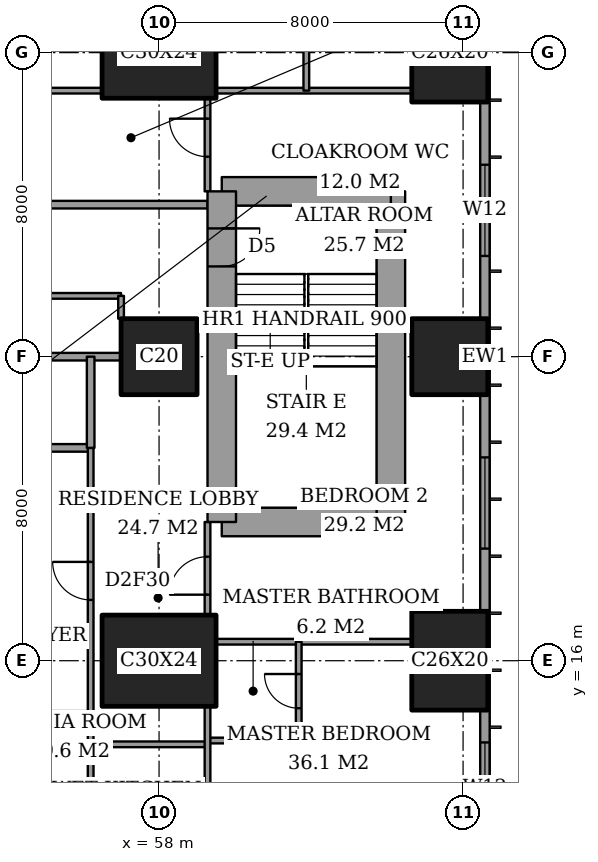
"""IFC4 building model, lengths in metres.
Left out: names, types, materials, properties, quantities, classifications, styles, units other than length and angle.
Written with IfcOpenShell. Run it as: python <this file> out.ifc"""

import sys

from ifc_helpers import new_model, si_unit, direction, frame, frame_2d, origin, origin_2d, place, context, subcontext, project, spatial, rectangle, extrude, element, fill, save


model = new_model("IFC4")
c1 = context("Model", 3, precision=1e-05, world=origin(), true_north=direction((0.0, 1.0)))
c2 = subcontext(c1, "Body", "Model", "MODEL_VIEW")
j1 = project(units=[si_unit("LENGTHUNIT", "METRE"), si_unit("PLANEANGLEUNIT", "RADIAN")], contexts=[c1])
p1 = place(None, origin())
s1 = spatial("IfcSite", under=j1, at=p1, CompositionType="ELEMENT")
p2 = place(p1, origin())
s2 = spatial("IfcBuilding", under=s1, at=p2, CompositionType="ELEMENT")
p3 = place(p2, frame((0.0, 0.0, 96.2)))
s3 = spatial("IfcBuildingStorey", under=s2, at=p3, CompositionType="ELEMENT", Elevation=96.2)
p4 = place(p3, frame((58.0, 16.0, 0.0), z_axis=(0.0, 0.0, 1.0), x_axis=(1.0, 0.0, 0.0)))
e1 = element("IfcColumn", 1, at=p4, inside=s3, PredefinedType="COLUMN", context=c2, shape_type="SweptSolid", body=[
    extrude(rectangle(XDim=3.0, YDim=2.4, at=origin_2d()), origin(), (0.0, 0.0, 1.0), 3.6),
])
p5 = place(p3, frame((58.0, 24.0, 0.0), z_axis=(0.0, 0.0, 1.0), x_axis=(1.0, 0.0, 0.0)))
e2 = element("IfcColumn", 2, at=p5, inside=s3, PredefinedType="COLUMN", context=c2, shape_type="SweptSolid", body=[
    extrude(rectangle(XDim=2.0, YDim=2.0, at=origin_2d()), origin(), (0.0, 0.0, 1.0), 3.6),
])
p6 = place(p3, frame((58.0, 32.0, 0.0), z_axis=(0.0, 0.0, 1.0), x_axis=(1.0, 0.0, 0.0)))
e3 = element("IfcColumn", 3, at=p6, inside=s3, PredefinedType="COLUMN", context=c2, shape_type="SweptSolid", body=[
    extrude(rectangle(XDim=3.0, YDim=2.4, at=origin_2d()), origin(), (0.0, 0.0, 1.0), 3.6),
])
p7 = place(p3, frame((65.65, 16.0, 0.0), z_axis=(0.0, 0.0, 1.0), x_axis=(0.0, 1.0, 0.0)))
e4 = element("IfcColumn", 4, at=p7, inside=s3, PredefinedType="COLUMN", context=c2, shape_type="SweptSolid", body=[
    extrude(rectangle(XDim=2.6, YDim=2.0, at=origin_2d()), origin(), (0.0, 0.0, 1.0), 3.6),
])
p8 = place(p3, frame((65.65, 24.0, 0.0), z_axis=(0.0, 0.0, 1.0), x_axis=(1.0, 0.0, 0.0)))
e5 = element("IfcColumn", 5, at=p8, inside=s3, PredefinedType="COLUMN", context=c2, shape_type="SweptSolid", body=[
    extrude(rectangle(XDim=2.0, YDim=2.0, at=origin_2d()), origin(), (0.0, 0.0, 1.0), 3.6),
])
p9 = place(p3, frame((65.65, 32.0, 0.0), z_axis=(0.0, 0.0, 1.0), x_axis=(0.0, 1.0, 0.0)))
e6 = element("IfcColumn", 6, at=p9, inside=s3, PredefinedType="COLUMN", context=c2, shape_type="SweptSolid", body=[
    extrude(rectangle(XDim=2.6, YDim=2.0, at=origin_2d()), origin(), (0.0, 0.0, 1.0), 3.6),
])
p10 = place(p3, frame((59.65, 19.65, 0.0), z_axis=(0.0, 0.0, 1.0), x_axis=(1.0, 0.0, 0.0)))
e7 = element("IfcWall", 7, at=p10, inside=s3, PredefinedType="SHEAR", context=c2, shape_type="SweptSolid", body=[
    extrude(rectangle(XDim=4.45, YDim=0.75, at=frame_2d((2.225, 0.0))), origin(), (0.0, 0.0, 1.0), 3.6),
])
p11 = place(p3, frame((64.1, 19.65, 0.0), z_axis=(0.0, 0.0, 1.0), x_axis=(0.0, 1.0, 0.0)))
e8 = element("IfcWall", 8, at=p11, inside=s3, PredefinedType="SHEAR", context=c2, shape_type="SweptSolid", body=[
    extrude(rectangle(XDim=8.7, YDim=0.75, at=frame_2d((4.35, 0.0))), origin(), (0.0, 0.0, 1.0), 3.6),
])
p12 = place(p3, frame((64.1, 28.35, 0.0), z_axis=(0.0, 0.0, 1.0), x_axis=(-1.0, 0.0, 0.0)))
e9 = element("IfcWall", 9, at=p12, inside=s3, PredefinedType="SHEAR", context=c2, shape_type="SweptSolid", body=[
    extrude(rectangle(XDim=4.45, YDim=0.75, at=frame_2d((2.225, 0.0))), origin(), (0.0, 0.0, 1.0), 3.6),
])
p13 = place(p3, frame((59.65, 28.35, 0.0), z_axis=(0.0, 0.0, 1.0), x_axis=(0.0, -1.0, 0.0)))
e10 = element("IfcWall", 10, at=p13, inside=s3, PredefinedType="SHEAR", context=c2, shape_type="SweptSolid", body=[
    extrude(rectangle(XDim=8.7, YDim=0.75, at=frame_2d((4.35, 0.0))), origin(), (0.0, 0.0, 1.0), 3.6),
])
p14 = place(p13, frame((0.975, 0.0, 0.0)))
e11 = element("IfcOpeningElement", 11, at=p14, cuts=e10, PredefinedType="OPENING", context=c2, shape_type="SweptSolid", body=[
    extrude(rectangle(XDim=1.0, YDim=2.1, at=frame_2d((0.5, 1.05))), frame((0.0, 0.385, 0.0), z_axis=(0.0, -1.0, 0.0), x_axis=(1.0, 0.0, 0.0)), (0.0, 0.0, 1.0), 0.77),
])
p15 = place(p3, frame((66.575, 3.175, 0.0), z_axis=(0.0, 0.0, 1.0), x_axis=(0.0, 1.0, 0.0)))
e12 = element("IfcWall", 12, at=p15, inside=s3, PredefinedType="SOLIDWALL", context=c2, shape_type="SweptSolid", body=[
    extrude(rectangle(XDim=41.65, YDim=0.25, at=frame_2d((20.825, 0.0))), origin(), (0.0, 0.0, 1.0), 3.6),
])
p16 = place(p15, frame((0.775, 0.0, 0.4)))
e13 = element("IfcOpeningElement", 13, at=p16, cuts=e12, PredefinedType="OPENING", context=c2, shape_type="SweptSolid", body=[
    extrude(rectangle(XDim=2.4, YDim=2.2, at=frame_2d((1.2, 1.1))), frame((0.0, 0.135, 0.0), z_axis=(0.0, -1.0, 0.0), x_axis=(1.0, 0.0, 0.0)), (0.0, 0.0, 1.0), 0.27),
])
p17 = place(p15, frame((6.1, 0.0, 0.4)))
e14 = element("IfcOpeningElement", 14, at=p17, cuts=e12, PredefinedType="OPENING", context=c2, shape_type="SweptSolid", body=[
    extrude(rectangle(XDim=1.2, YDim=2.2, at=frame_2d((0.6, 1.1))), frame((0.0, 0.135, 0.0), z_axis=(0.0, -1.0, 0.0), x_axis=(1.0, 0.0, 0.0)), (0.0, 0.0, 1.0), 0.27),
])
p18 = place(p15, frame((8.275, 0.0, 0.4)))
e15 = element("IfcOpeningElement", 15, at=p18, cuts=e12, PredefinedType="OPENING", context=c2, shape_type="SweptSolid", body=[
    extrude(rectangle(XDim=2.4, YDim=2.2, at=frame_2d((1.2, 1.1))), frame((0.0, 0.135, 0.0), z_axis=(0.0, -1.0, 0.0), x_axis=(1.0, 0.0, 0.0)), (0.0, 0.0, 1.0), 0.27),
])
p19 = place(p15, frame((15.775, 0.0, 0.4)))
e16 = element("IfcOpeningElement", 16, at=p19, cuts=e12, PredefinedType="OPENING", context=c2, shape_type="SweptSolid", body=[
    extrude(rectangle(XDim=2.4, YDim=2.2, at=frame_2d((1.2, 1.1))), frame((0.0, 0.135, 0.0), z_axis=(0.0, -1.0, 0.0), x_axis=(1.0, 0.0, 0.0)), (0.0, 0.0, 1.0), 0.27),
])
p20 = place(p15, frame((23.475, 0.0, 0.4)))
e17 = element("IfcOpeningElement", 17, at=p20, cuts=e12, PredefinedType="OPENING", context=c2, shape_type="SweptSolid", body=[
    extrude(rectangle(XDim=2.4, YDim=2.2, at=frame_2d((1.2, 1.1))), frame((0.0, 0.135, 0.0), z_axis=(0.0, -1.0, 0.0), x_axis=(1.0, 0.0, 0.0)), (0.0, 0.0, 1.0), 0.27),
])
p21 = place(p15, frame((30.975, 0.0, 0.4)))
e18 = element("IfcOpeningElement", 18, at=p21, cuts=e12, PredefinedType="OPENING", context=c2, shape_type="SweptSolid", body=[
    extrude(rectangle(XDim=2.4, YDim=2.2, at=frame_2d((1.2, 1.1))), frame((0.0, 0.135, 0.0), z_axis=(0.0, -1.0, 0.0), x_axis=(1.0, 0.0, 0.0)), (0.0, 0.0, 1.0), 0.27),
])
p22 = place(p15, frame((34.5, 0.0, 0.4)))
e19 = element("IfcOpeningElement", 19, at=p22, cuts=e12, PredefinedType="OPENING", context=c2, shape_type="SweptSolid", body=[
    extrude(rectangle(XDim=1.2, YDim=2.2, at=frame_2d((0.6, 1.1))), frame((0.0, 0.135, 0.0), z_axis=(0.0, -1.0, 0.0), x_axis=(1.0, 0.0, 0.0)), (0.0, 0.0, 1.0), 0.27),
])
p23 = place(p15, frame((38.475, 0.0, 0.4)))
e20 = element("IfcOpeningElement", 20, at=p23, cuts=e12, PredefinedType="OPENING", context=c2, shape_type="SweptSolid", body=[
    extrude(rectangle(XDim=2.4, YDim=2.2, at=frame_2d((1.2, 1.1))), frame((0.0, 0.135, 0.0), z_axis=(0.0, -1.0, 0.0), x_axis=(1.0, 0.0, 0.0)), (0.0, 0.0, 1.0), 0.27),
])
p24 = place(p3, frame((56.2, 13.8, 0.0), z_axis=(0.0, 0.0, 1.0), x_axis=(1.0, 0.0, 0.0)))
e21 = element("IfcWall", 21, at=p24, inside=s3, PredefinedType="PARTITIONING", context=c2, shape_type="SweptSolid", body=[
    extrude(rectangle(XDim=3.075, YDim=0.15, at=frame_2d((1.538, 0.0))), origin(), (0.0, 0.0, 1.0), 3.35),
])
p25 = place(p3, frame((59.275, 13.9, 0.0), z_axis=(0.0, 0.0, 1.0), x_axis=(1.0, 0.0, 0.0)))
e22 = element("IfcWall", 22, at=p25, inside=s3, PredefinedType="PARTITIONING", context=c2, shape_type="SweptSolid", body=[
    extrude(rectangle(XDim=2.4, YDim=0.15, at=frame_2d((1.2, 0.0))), origin(), (0.0, 0.0, 1.0), 3.35),
])
p26 = place(p3, frame((48.0, 14.6, 0.0), z_axis=(0.0, 0.0, 1.0), x_axis=(1.0, 0.0, 0.0)))
e23 = element("IfcWall", 23, at=p26, inside=s3, PredefinedType="PARTITIONING", context=c2, shape_type="SweptSolid", body=[
    extrude(rectangle(XDim=8.2, YDim=0.15, at=frame_2d((4.1, 0.0))), origin(), (0.0, 0.0, 1.0), 3.35),
])
p27 = place(p26, frame((4.2, 0.0, 0.0)))
e24 = element("IfcOpeningElement", 24, at=p27, cuts=e23, PredefinedType="OPENING", context=c2, shape_type="SweptSolid", body=[
    extrude(rectangle(XDim=1.0, YDim=2.1, at=frame_2d((0.5, 1.05))), frame((0.0, 0.085, 0.0), z_axis=(0.0, -1.0, 0.0), x_axis=(1.0, 0.0, 0.0)), (0.0, 0.0, 1.0), 0.17),
])
p28 = place(p3, frame((59.5, 16.5, 0.0), z_axis=(0.0, 0.0, 1.0), x_axis=(1.0, 0.0, 0.0)))
e25 = element("IfcWall", 25, at=p28, inside=s3, PredefinedType="PARTITIONING", context=c2, shape_type="SweptSolid", body=[
    extrude(rectangle(XDim=5.15, YDim=0.15, at=frame_2d((2.575, 0.0))), origin(), (0.0, 0.0, 1.0), 3.35),
])
p29 = place(p3, frame((51.2, 21.6, 0.0), z_axis=(0.0, 0.0, 1.0), x_axis=(1.0, 0.0, 0.0)))
e26 = element("IfcWall", 26, at=p29, inside=s3, PredefinedType="PARTITIONING", context=c2, shape_type="SweptSolid", body=[
    extrude(rectangle(XDim=5.0, YDim=0.2, at=frame_2d((2.5, 0.0))), origin(), (0.0, 0.0, 1.0), 3.35),
])
p30 = place(p29, frame((2.05, 0.0, 0.0)))
e27 = element("IfcOpeningElement", 27, at=p30, cuts=e26, PredefinedType="OPENING", context=c2, shape_type="SweptSolid", body=[
    extrude(rectangle(XDim=0.9, YDim=2.1, at=frame_2d((0.45, 1.05))), frame((0.0, 0.11, 0.0), z_axis=(0.0, -1.0, 0.0), x_axis=(1.0, 0.0, 0.0)), (0.0, 0.0, 1.0), 0.22),
])
p31 = place(p3, frame((51.0, 24.0, 0.0), z_axis=(0.0, 0.0, 1.0), x_axis=(1.0, 0.0, 0.0)))
e28 = element("IfcWall", 28, at=p31, inside=s3, PredefinedType="PARTITIONING", context=c2, shape_type="SweptSolid", body=[
    extrude(rectangle(XDim=6.0, YDim=0.2, at=frame_2d((3.0, 0.0))), origin(), (0.0, 0.0, 1.0), 3.35),
])
p32 = place(p3, frame((48.6, 25.6, 0.0), z_axis=(0.0, 0.0, 1.0), x_axis=(1.0, 0.0, 0.0)))
e29 = element("IfcWall", 29, at=p32, inside=s3, PredefinedType="PARTITIONING", context=c2, shape_type="SweptSolid", body=[
    extrude(rectangle(XDim=8.4, YDim=0.15, at=frame_2d((4.2, 0.0))), origin(), (0.0, 0.0, 1.0), 3.35),
])
p33 = place(p32, frame((3.75, 0.0, 0.0)))
e30 = element("IfcOpeningElement", 30, at=p33, cuts=e29, PredefinedType="OPENING", context=c2, shape_type="SweptSolid", body=[
    extrude(rectangle(XDim=0.9, YDim=2.1, at=frame_2d((0.45, 1.05))), frame((0.0, 0.085, 0.0), z_axis=(0.0, -1.0, 0.0), x_axis=(1.0, 0.0, 0.0)), (0.0, 0.0, 1.0), 0.17),
])
p34 = place(p3, frame((42.0, 28.0, 0.0), z_axis=(0.0, 0.0, 1.0), x_axis=(1.0, 0.0, 0.0)))
e31 = element("IfcWall", 31, at=p34, inside=s3, PredefinedType="PARTITIONING", context=c2, shape_type="SweptSolid", body=[
    extrude(rectangle(XDim=17.275, YDim=0.2, at=frame_2d((8.637, 0.0))), origin(), (0.0, 0.0, 1.0), 3.35),
])
p35 = place(p34, frame((8.9, 0.0, 0.0)))
e32 = element("IfcOpeningElement", 32, at=p35, cuts=e31, PredefinedType="OPENING", context=c2, shape_type="SweptSolid", body=[
    extrude(rectangle(XDim=1.2, YDim=2.4, at=frame_2d((0.6, 1.2))), frame((0.0, 0.11, 0.0), z_axis=(0.0, -1.0, 0.0), x_axis=(1.0, 0.0, 0.0)), (0.0, 0.0, 1.0), 0.22),
])
p36 = place(p3, frame((55.0, 31.0, 0.0), z_axis=(0.0, 0.0, 1.0), x_axis=(1.0, 0.0, 0.0)))
e33 = element("IfcWall", 33, at=p36, inside=s3, PredefinedType="PARTITIONING", context=c2, shape_type="SweptSolid", body=[
    extrude(rectangle(XDim=1.5, YDim=0.15, at=frame_2d((0.75, 0.0))), origin(), (0.0, 0.0, 1.0), 3.35),
])
p37 = place(p3, frame((59.5, 31.0, 0.0), z_axis=(0.0, 0.0, 1.0), x_axis=(1.0, 0.0, 0.0)))
e34 = element("IfcWall", 34, at=p37, inside=s3, PredefinedType="PARTITIONING", context=c2, shape_type="SweptSolid", body=[
    extrude(rectangle(XDim=5.15, YDim=0.15, at=frame_2d((2.575, 0.0))), origin(), (0.0, 0.0, 1.0), 3.35),
])
p38 = place(p3, frame((56.2, 21.6, 0.0), z_axis=(0.0, 0.0, 1.0), x_axis=(0.0, 1.0, 0.0)))
e35 = element("IfcWall", 35, at=p38, inside=s3, PredefinedType="PARTITIONING", context=c2, shape_type="SweptSolid", body=[
    extrude(rectangle(XDim=2.4, YDim=0.2, at=frame_2d((1.2, 0.0))), origin(), (0.0, 0.0, 1.0), 3.35),
])
p39 = place(p3, frame((56.2, 10.6, 0.0), z_axis=(0.0, 0.0, 1.0), x_axis=(0.0, 1.0, 0.0)))
e36 = element("IfcWall", 36, at=p39, inside=s3, PredefinedType="PARTITIONING", context=c2, shape_type="SweptSolid", body=[
    extrude(rectangle(XDim=11.0, YDim=0.15, at=frame_2d((5.5, 0.0))), origin(), (0.0, 0.0, 1.0), 3.35),
])
p40 = place(p39, frame((7.0, 0.0, 0.0)))
e37 = element("IfcOpeningElement", 37, at=p40, cuts=e36, PredefinedType="OPENING", context=c2, shape_type="SweptSolid", body=[
    extrude(rectangle(XDim=1.0, YDim=2.1, at=frame_2d((0.5, 1.05))), frame((0.0, 0.085, 0.0), z_axis=(0.0, -1.0, 0.0), x_axis=(1.0, 0.0, 0.0)), (0.0, 0.0, 1.0), 0.17),
])
p41 = place(p3, frame((57.0, 25.0, 0.0), z_axis=(0.0, 0.0, 1.0), x_axis=(0.0, 1.0, 0.0)))
e38 = element("IfcWall", 38, at=p41, inside=s3, PredefinedType="PARTITIONING", context=c2, shape_type="SweptSolid", body=[
    extrude(rectangle(XDim=0.6, YDim=0.15, at=frame_2d((0.3, 0.0))), origin(), (0.0, 0.0, 1.0), 3.35),
])
p42 = place(p3, frame((59.275, 10.6, 0.0), z_axis=(0.0, 0.0, 1.0), x_axis=(0.0, 1.0, 0.0)))
e39 = element("IfcWall", 39, at=p42, inside=s3, PredefinedType="PARTITIONING", context=c2, shape_type="SweptSolid", body=[
    extrude(rectangle(XDim=4.2, YDim=0.15, at=frame_2d((2.1, 0.0))), origin(), (0.0, 0.0, 1.0), 3.35),
])
p43 = place(p3, frame((59.275, 17.2, 0.0), z_axis=(0.0, 0.0, 1.0), x_axis=(0.0, 1.0, 0.0)))
e40 = element("IfcWall", 40, at=p43, inside=s3, PredefinedType="PARTITIONING", context=c2, shape_type="SweptSolid", body=[
    extrude(rectangle(XDim=2.45, YDim=0.15, at=frame_2d((1.225, 0.0))), origin(), (0.0, 0.0, 1.0), 3.35),
])
p44 = place(p43, frame((0.538, 0.0, 0.0)))
e41 = element("IfcOpeningElement", 41, at=p44, cuts=e40, PredefinedType="OPENING", context=c2, shape_type="SweptSolid", body=[
    extrude(rectangle(XDim=1.0, YDim=2.1, at=frame_2d((0.5, 1.05))), frame((0.0, 0.085, 0.0), z_axis=(0.0, -1.0, 0.0), x_axis=(1.0, 0.0, 0.0)), (0.0, 0.0, 1.0), 0.17),
])
p45 = place(p3, frame((59.275, 28.35, 0.0), z_axis=(0.0, 0.0, 1.0), x_axis=(0.0, 1.0, 0.0)))
e42 = element("IfcWall", 42, at=p45, inside=s3, PredefinedType="PARTITIONING", context=c2, shape_type="SweptSolid", body=[
    extrude(rectangle(XDim=2.45, YDim=0.15, at=frame_2d((1.225, 0.0))), origin(), (0.0, 0.0, 1.0), 3.35),
])
p46 = place(p45, frame((0.913, 0.0, 0.0)))
e43 = element("IfcOpeningElement", 43, at=p46, cuts=e42, PredefinedType="OPENING", context=c2, shape_type="SweptSolid", body=[
    extrude(rectangle(XDim=1.0, YDim=2.1, at=frame_2d((0.5, 1.05))), frame((0.0, 0.085, 0.0), z_axis=(0.0, -1.0, 0.0), x_axis=(1.0, 0.0, 0.0)), (0.0, 0.0, 1.0), 0.17),
])
p47 = place(p3, frame((61.675, 13.9, 0.0), z_axis=(0.0, 0.0, 1.0), x_axis=(0.0, 1.0, 0.0)))
e44 = element("IfcWall", 44, at=p47, inside=s3, PredefinedType="PARTITIONING", context=c2, shape_type="SweptSolid", body=[
    extrude(rectangle(XDim=2.6, YDim=0.15, at=frame_2d((1.3, 0.0))), origin(), (0.0, 0.0, 1.0), 3.35),
])
p48 = place(p47, frame((0.85, 0.0, 0.0)))
e45 = element("IfcOpeningElement", 45, at=p48, cuts=e44, PredefinedType="OPENING", context=c2, shape_type="SweptSolid", body=[
    extrude(rectangle(XDim=0.9, YDim=2.1, at=frame_2d((0.45, 1.05))), frame((0.0, 0.085, 0.0), z_axis=(0.0, -1.0, 0.0), x_axis=(1.0, 0.0, 0.0)), (0.0, 0.0, 1.0), 0.17),
])
p49 = place(p3, frame((61.875, 31.0, 0.0), z_axis=(0.0, 0.0, 1.0), x_axis=(0.0, 1.0, 0.0)))
e46 = element("IfcWall", 46, at=p49, inside=s3, PredefinedType="PARTITIONING", context=c2, shape_type="SweptSolid", body=[
    extrude(rectangle(XDim=3.0, YDim=0.15, at=frame_2d((1.5, 0.0))), origin(), (0.0, 0.0, 1.0), 3.35),
])
p50 = place(p49, frame((1.05, 0.0, 0.0)))
e47 = element("IfcOpeningElement", 47, at=p50, cuts=e46, PredefinedType="OPENING", context=c2, shape_type="SweptSolid", body=[
    extrude(rectangle(XDim=0.9, YDim=2.1, at=frame_2d((0.45, 1.05))), frame((0.0, 0.085, 0.0), z_axis=(0.0, -1.0, 0.0), x_axis=(1.0, 0.0, 0.0)), (0.0, 0.0, 1.0), 0.17),
])
p51 = place(p18, origin())
e48 = element("IfcWindow", 48, at=p51, inside=s3, PartitioningType="SINGLE_PANEL", PredefinedType="WINDOW", context=c2, shape_type="SweptSolid", body=[
    extrude(rectangle(XDim=2.4, YDim=2.2, at=frame_2d((1.2, 1.1))), frame((0.0, 0.03, 0.0), z_axis=(0.0, -1.0, 0.0), x_axis=(1.0, 0.0, 0.0)), (0.0, 0.0, 1.0), 0.06),
])
fill(e15, e48)
p52 = place(p19, origin())
e49 = element("IfcWindow", 49, at=p52, inside=s3, PartitioningType="SINGLE_PANEL", PredefinedType="WINDOW", context=c2, shape_type="SweptSolid", body=[
    extrude(rectangle(XDim=2.4, YDim=2.2, at=frame_2d((1.2, 1.1))), frame((0.0, 0.03, 0.0), z_axis=(0.0, -1.0, 0.0), x_axis=(1.0, 0.0, 0.0)), (0.0, 0.0, 1.0), 0.06),
])
fill(e16, e49)
p53 = place(p20, origin())
e50 = element("IfcWindow", 50, at=p53, inside=s3, PartitioningType="SINGLE_PANEL", PredefinedType="WINDOW", context=c2, shape_type="SweptSolid", body=[
    extrude(rectangle(XDim=2.4, YDim=2.2, at=frame_2d((1.2, 1.1))), frame((0.0, 0.03, 0.0), z_axis=(0.0, -1.0, 0.0), x_axis=(1.0, 0.0, 0.0)), (0.0, 0.0, 1.0), 0.06),
])
fill(e17, e50)
p54 = place(p48, origin())
e51 = element("IfcDoor", 51, at=p54, inside=s3, OperationType="SINGLE_SWING_LEFT", PredefinedType="DOOR", context=c2, shape_type="SweptSolid", body=[
    extrude(rectangle(XDim=0.9, YDim=2.1, at=frame_2d((0.45, 1.05))), frame((0.0, 0.025, 0.0), z_axis=(0.0, -1.0, 0.0), x_axis=(1.0, 0.0, 0.0)), (0.0, 0.0, 1.0), 0.05),
])
fill(e45, e51)
p55 = place(p44, origin())
e52 = element("IfcDoor", 52, at=p55, inside=s3, OperationType="SINGLE_SWING_RIGHT", PredefinedType="DOOR", context=c2, shape_type="SweptSolid", body=[
    extrude(rectangle(XDim=1.0, YDim=2.1, at=frame_2d((0.5, 1.05))), frame((0.0, 0.025, 0.0), z_axis=(0.0, -1.0, 0.0), x_axis=(1.0, 0.0, 0.0)), (0.0, 0.0, 1.0), 0.05),
])
fill(e41, e52)
p56 = place(p40, origin())
e53 = element("IfcDoor", 53, at=p56, inside=s3, OperationType="SINGLE_SWING_LEFT", PredefinedType="DOOR", context=c2, shape_type="SweptSolid", body=[
    extrude(rectangle(XDim=1.0, YDim=2.1, at=frame_2d((0.5, 1.05))), frame((0.0, 0.025, 0.0), z_axis=(0.0, -1.0, 0.0), x_axis=(1.0, 0.0, 0.0)), (0.0, 0.0, 1.0), 0.05),
])
fill(e37, e53)
p57 = place(p46, origin())
e54 = element("IfcDoor", 54, at=p57, inside=s3, OperationType="SINGLE_SWING_LEFT", PredefinedType="DOOR", context=c2, shape_type="SweptSolid", body=[
    extrude(rectangle(XDim=1.0, YDim=2.1, at=frame_2d((0.5, 1.05))), frame((0.0, 0.025, 0.0), z_axis=(0.0, -1.0, 0.0), x_axis=(1.0, 0.0, 0.0)), (0.0, 0.0, 1.0), 0.05),
])
fill(e43, e54)
p58 = place(p14, origin())
e55 = element("IfcDoor", 55, at=p58, inside=s3, OperationType="SINGLE_SWING_RIGHT", PredefinedType="DOOR", context=c2, shape_type="SweptSolid", body=[
    extrude(rectangle(XDim=1.0, YDim=2.1, at=frame_2d((0.5, 1.05))), frame((0.0, 0.025, 0.0), z_axis=(0.0, -1.0, 0.0), x_axis=(1.0, 0.0, 0.0)), (0.0, 0.0, 1.0), 0.05),
])
fill(e11, e55)
save(model, sys.argv[1])
